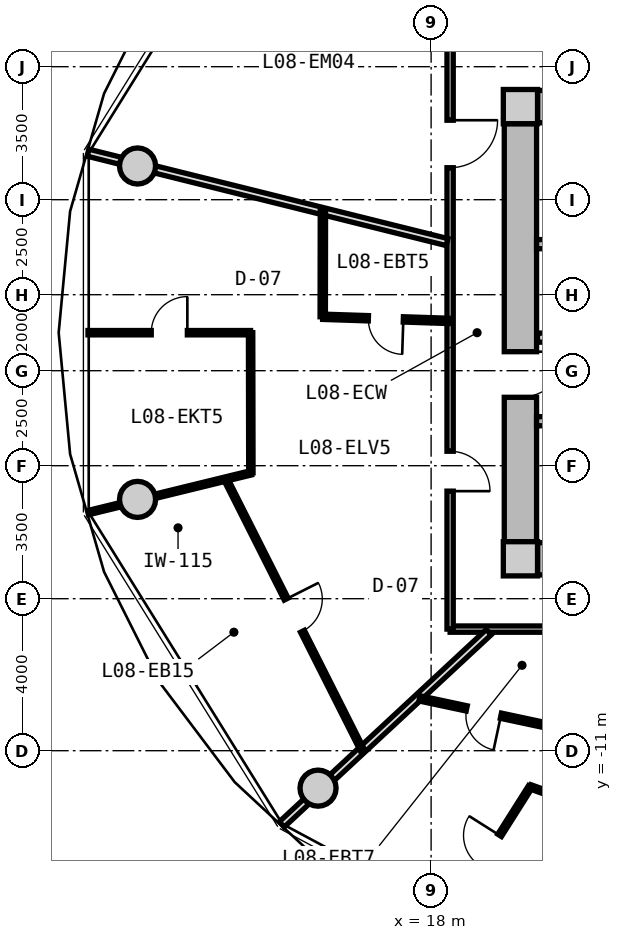
"""IFC4 building model, lengths in metres.
Left out: names, types, materials, properties, quantities, classifications, styles, units other than length and angle.
Written with IfcOpenShell. Run it as: python <this file> out.ifc"""

import sys

from ifc_helpers import new_model, si_unit, direction, frame, frame_2d, origin, origin_2d, place, context, subcontext, project, spatial, rectangle, circle, extrude, source, transform, mapped, element, fill, save


model = new_model("IFC4")
c1 = context("Model", 3, precision=1e-05, world=origin(), true_north=direction((0.0, 1.0)))
c2 = subcontext(c1, "Body", "Model", "MODEL_VIEW")
j1 = project(units=[si_unit("LENGTHUNIT", "METRE"), si_unit("PLANEANGLEUNIT", "RADIAN")], contexts=[c1])
p1 = place(None, origin())
s1 = spatial("IfcSite", under=j1, at=p1, CompositionType="ELEMENT")
p2 = place(p1, origin())
s2 = spatial("IfcBuilding", under=s1, at=p2, CompositionType="ELEMENT")
p3 = place(p2, frame((0.0, 0.0, 30.75)))
s3 = spatial("IfcBuildingStorey", under=s2, at=p3, CompositionType="ELEMENT", Elevation=30.75)
m1 = source(origin(), c2, "Body", "SweptSolid", [
    extrude(rectangle(XDim=0.9, YDim=0.9, at=origin_2d()), origin(), (0.0, 0.0, 1.0), 3.05),
])
for number, where, z_axis, x_axis in (
    (1, (20.35, -5.95, 0.0), (0.0, 0.0, 1.0), (1.0, 0.0, 0.0)),
    (2, (20.35, 5.95, 0.0), (0.0, 0.0, 1.0), (1.0, 0.0, 0.0)),
):
    element("IfcColumn", number, at=place(p3, frame(where, z_axis=z_axis, x_axis=x_axis)), inside=s3, PredefinedType="COLUMN", context=c2, shape_type="MappedRepresentation", body=[
        mapped(m1, transform((0.0, 0.0, 0.0), x_axis=(1.0, 0.0, 0.0), y_axis=(0.0, 1.0, 0.0), z_axis=(0.0, 0.0, 1.0), scale=1.0)),
    ])
m2 = source(origin(), c2, "Body", "SweptSolid", [
    extrude(rectangle(XDim=14.4, YDim=0.85, at=frame_2d((7.2, 0.0))), origin(), (0.0, 0.0, 1.0), 2.79),
])
for number, where, z_axis, x_axis in (
    (3, (20.8, 5.95, 0.0), (0.0, 0.0, 1.0), (1.0, 0.0, 0.0)),
    (4, (35.2, -5.95, 0.0), (0.0, 0.0, 1.0), (-1.0, 0.0, 0.0)),
):
    element("IfcWall", number, at=place(p3, frame(where, z_axis=z_axis, x_axis=x_axis)), inside=s3, PredefinedType="SHEAR", context=c2, shape_type="MappedRepresentation", body=[
        mapped(m2, transform((0.0, 0.0, 0.0), x_axis=(1.0, 0.0, 0.0), y_axis=(0.0, 1.0, 0.0), z_axis=(0.0, 0.0, 1.0), scale=1.0)),
    ])
m3 = source(origin(), c2, "Body", "SweptSolid", [
    extrude(rectangle(XDim=11.0, YDim=0.85, at=frame_2d((5.5, 0.0))), origin(), (0.0, 0.0, 1.0), 2.79),
])
p4 = place(p3, frame((20.35, -5.5, 0.0), z_axis=(0.0, 0.0, 1.0), x_axis=(0.0, 1.0, 0.0)))
e5 = element("IfcWall", 5, at=p4, inside=s3, PredefinedType="SHEAR", context=c2, shape_type="MappedRepresentation", body=[
    mapped(m3, transform((0.0, 0.0, 0.0), x_axis=(1.0, 0.0, 0.0), y_axis=(0.0, 1.0, 0.0), z_axis=(0.0, 0.0, 1.0), scale=1.0)),
])
p5 = place(p4, frame((3.8, 0.0, 0.0)))
e6 = element("IfcOpeningElement", 6, at=p5, cuts=e5, PredefinedType="OPENING", context=c2, shape_type="SweptSolid", body=[
    extrude(rectangle(XDim=1.2, YDim=2.15, at=frame_2d((0.6, 1.075))), frame((0.0, 0.435, 0.0), z_axis=(0.0, -1.0, 0.0), x_axis=(1.0, 0.0, 0.0)), (0.0, 0.0, 1.0), 0.87),
])
m4 = source(origin(), c2, "Body", "SweptSolid", [
    extrude(circle(Radius=0.475, at=origin_2d()), origin(), (0.0, 0.0, 1.0), 3.05),
])
for number, where, z_axis, x_axis in (
    (7, (10.275, 4.387, 0.0), (0.0, 0.0, 1.0), (1.0, 0.0, 0.0)),
    (8, (10.275, -4.387, 0.0), (0.0, 0.0, 1.0), (1.0, 0.0, 0.0)),
    (9, (15.025, -11.985, 0.0), (0.0, 0.0, 1.0), (1.0, 0.0, 0.0)),
):
    element("IfcColumn", number, at=place(p3, frame(where, z_axis=z_axis, x_axis=x_axis)), inside=s3, PredefinedType="COLUMN", context=c2, shape_type="MappedRepresentation", body=[
        mapped(m4, transform((0.0, 0.0, 0.0), x_axis=(1.0, 0.0, 0.0), y_axis=(0.0, 1.0, 0.0), z_axis=(0.0, 0.0, 1.0), scale=1.0)),
    ])
m5 = source(origin(), c2, "Body", "SweptSolid", [
    extrude(rectangle(XDim=7.765, YDim=0.24, at=frame_2d((3.883, 0.0))), origin(), (0.0, 0.0, 1.0), 2.79),
])
p6 = place(p3, frame((20.775, 2.33, 0.0), z_axis=(0.0, 0.0, 1.0), x_axis=(1.0, 0.0, 0.0)))
e10 = element("IfcWall", 10, at=p6, inside=s3, PredefinedType="PARTITIONING", context=c2, shape_type="MappedRepresentation", body=[
    mapped(m5, transform((0.0, 0.0, 0.0), x_axis=(1.0, 0.0, 0.0), y_axis=(0.0, 1.0, 0.0), z_axis=(0.0, 0.0, 1.0), scale=1.0)),
])
p7 = place(p3, frame((20.775, -2.33, 0.0), z_axis=(0.0, 0.0, 1.0), x_axis=(1.0, 0.0, 0.0)))
e11 = element("IfcWall", 11, at=p7, inside=s3, PredefinedType="PARTITIONING", context=c2, shape_type="MappedRepresentation", body=[
    mapped(m5, transform((0.0, 0.0, 0.0), x_axis=(1.0, 0.0, 0.0), y_axis=(0.0, 1.0, 0.0), z_axis=(0.0, 0.0, 1.0), scale=1.0)),
])
p8 = place(p7, frame((0.885, 0.0, 0.0)))
e12 = element("IfcOpeningElement", 12, at=p8, cuts=e11, PredefinedType="OPENING", context=c2, shape_type="SweptSolid", body=[
    extrude(rectangle(XDim=1.1, YDim=2.15, at=frame_2d((0.55, 1.075))), frame((0.0, 0.13, 0.0), z_axis=(0.0, -1.0, 0.0), x_axis=(1.0, 0.0, 0.0)), (0.0, 0.0, 1.0), 0.26),
])
m6 = source(origin(), c2, "Body", "SweptSolid", [
    extrude(rectangle(XDim=7.62, YDim=0.24, at=frame_2d((3.81, 0.0))), origin(), (0.0, 0.0, 1.0), 2.775),
])
p9 = place(p3, frame((20.8, -0.13, 0.0), z_axis=(0.0, 0.0, 1.0), x_axis=(1.0, 0.0, 0.0)))
e13 = element("IfcWall", 13, at=p9, inside=s3, PredefinedType="PARTITIONING", context=c2, shape_type="MappedRepresentation", body=[
    mapped(m6, transform((0.0, 0.0, 0.0), x_axis=(1.0, 0.0, 0.0), y_axis=(0.0, 1.0, 0.0), z_axis=(0.0, 0.0, 1.0), scale=1.0)),
])
p10 = place(p9, frame((6.22, 0.0, 0.0)))
e14 = element("IfcOpeningElement", 14, at=p10, cuts=e13, PredefinedType="OPENING", context=c2, shape_type="SweptSolid", body=[
    extrude(rectangle(XDim=1.0, YDim=2.1, at=frame_2d((0.5, 1.05))), frame((0.0, 0.13, 0.0), z_axis=(0.0, -1.0, 0.0), x_axis=(1.0, 0.0, 0.0)), (0.0, 0.0, 1.0), 0.26),
])
p11 = place(p9, frame((0.85, 0.0, 0.0)))
e15 = element("IfcOpeningElement", 15, at=p11, cuts=e13, PredefinedType="OPENING", context=c2, shape_type="SweptSolid", body=[
    extrude(rectangle(XDim=1.1, YDim=2.2, at=frame_2d((0.55, 1.1))), frame((0.0, 0.13, 0.0), z_axis=(0.0, -1.0, 0.0), x_axis=(1.0, 0.0, 0.0)), (0.0, 0.0, 1.0), 0.26),
])
p12 = place(p9, frame((3.85, 0.0, 0.0)))
e16 = element("IfcOpeningElement", 16, at=p12, cuts=e13, PredefinedType="OPENING", context=c2, shape_type="SweptSolid", body=[
    extrude(rectangle(XDim=1.1, YDim=2.2, at=frame_2d((0.55, 1.1))), frame((0.0, 0.13, 0.0), z_axis=(0.0, -1.0, 0.0), x_axis=(1.0, 0.0, 0.0)), (0.0, 0.0, 1.0), 0.26),
])
m7 = source(origin(), c2, "Body", "SweptSolid", [
    extrude(rectangle(XDim=19.0, YDim=0.165, at=frame_2d((9.5, 0.0))), origin(), (0.0, 0.0, 1.0), 2.775),
])
p13 = place(p3, frame((37.5, -7.8, 0.0), z_axis=(0.0, 0.0, 1.0), x_axis=(-1.0, 0.0, 0.0)))
e17 = element("IfcWall", 17, at=p13, inside=s3, PredefinedType="PARTITIONING", context=c2, shape_type="MappedRepresentation", body=[
    mapped(m7, transform((0.0, 0.0, 0.0), x_axis=(1.0, 0.0, 0.0), y_axis=(0.0, 1.0, 0.0), z_axis=(0.0, 0.0, 1.0), scale=1.0)),
])
p14 = place(p13, frame((7.336, 0.0, 0.0)))
e18 = element("IfcOpeningElement", 18, at=p14, cuts=e17, PredefinedType="OPENING", context=c2, shape_type="SweptSolid", body=[
    extrude(rectangle(XDim=1.05, YDim=2.15, at=frame_2d((0.525, 1.075))), frame((0.0, 0.093, 0.0), z_axis=(0.0, -1.0, 0.0), x_axis=(1.0, 0.0, 0.0)), (0.0, 0.0, 1.0), 0.185),
])
m8 = source(origin(), c2, "Body", "SweptSolid", [
    extrude(rectangle(XDim=15.6, YDim=0.165, at=frame_2d((7.8, 0.0))), origin(), (0.0, 0.0, 1.0), 2.775),
])
p15 = place(p3, frame((18.5, -7.8, 0.0), z_axis=(0.0, 0.0, 1.0), x_axis=(0.0, 1.0, 0.0)))
e19 = element("IfcWall", 19, at=p15, inside=s3, PredefinedType="PARTITIONING", context=c2, shape_type="MappedRepresentation", body=[
    mapped(m8, transform((0.0, 0.0, 0.0), x_axis=(1.0, 0.0, 0.0), y_axis=(0.0, 1.0, 0.0), z_axis=(0.0, 0.0, 1.0), scale=1.0)),
])
p16 = place(p15, frame((12.141, 0.0, 0.0)))
e20 = element("IfcOpeningElement", 20, at=p16, cuts=e19, PredefinedType="OPENING", context=c2, shape_type="SweptSolid", body=[
    extrude(rectangle(XDim=1.25, YDim=2.2, at=frame_2d((0.625, 1.1))), frame((0.0, 0.093, 0.0), z_axis=(0.0, -1.0, 0.0), x_axis=(1.0, 0.0, 0.0)), (0.0, 0.0, 1.0), 0.185),
])
p17 = place(p15, frame((3.63, 0.0, 0.0)))
e21 = element("IfcOpeningElement", 21, at=p17, cuts=e19, PredefinedType="OPENING", context=c2, shape_type="SweptSolid", body=[
    extrude(rectangle(XDim=1.05, YDim=2.15, at=frame_2d((0.525, 1.075))), frame((0.0, 0.093, 0.0), z_axis=(0.0, -1.0, 0.0), x_axis=(1.0, 0.0, 0.0)), (0.0, 0.0, 1.0), 0.185),
])
m9 = source(origin(), c2, "Body", "SweptSolid", [
    extrude(rectangle(XDim=9.737, YDim=0.19, at=frame_2d((4.869, 0.0))), origin(), (0.0, 0.0, 1.0), 2.225),
])
p18 = place(p3, frame((18.42, 2.385, 0.0), z_axis=(0.0, 0.0, 1.0), x_axis=(-0.970392716238, 0.241532557375, 0.0)))
e22 = element("IfcWall", 22, at=p18, inside=s3, PredefinedType="PARTITIONING", context=c2, shape_type="MappedRepresentation", body=[
    mapped(m9, transform((0.0, 0.0, 0.0), x_axis=(1.0, 0.0, 0.0), y_axis=(0.0, 1.0, 0.0), z_axis=(0.0, 0.0, 1.0), scale=1.0)),
])
m10 = source(origin(), c2, "Body", "SweptSolid", [
    extrude(rectangle(XDim=7.435, YDim=0.19, at=frame_2d((3.717, 0.0))), origin(), (0.0, 0.0, 1.0), 2.225),
])
p19 = place(p3, frame((19.517, -7.88, 0.0), z_axis=(0.0, 0.0, 1.0), x_axis=(-0.732651956848, -0.680603489652, 0.0)))
e23 = element("IfcWall", 23, at=p19, inside=s3, PredefinedType="PARTITIONING", context=c2, shape_type="MappedRepresentation", body=[
    mapped(m10, transform((0.0, 0.0, 0.0), x_axis=(1.0, 0.0, 0.0), y_axis=(0.0, 1.0, 0.0), z_axis=(0.0, 0.0, 1.0), scale=1.0)),
])
m11 = source(origin(), c2, "Body", "SweptSolid", [
    extrude(rectangle(XDim=8.018, YDim=0.115, at=frame_2d((4.009, 0.0))), origin(), (0.0, 0.0, 1.0), 2.775),
])
p20 = place(p3, frame((12.596, -3.854, 0.0), z_axis=(0.0, 0.0, 1.0), x_axis=(0.450134355233, -0.89296084026, 0.0)))
e24 = element("IfcWall", 24, at=p20, inside=s3, PredefinedType="PARTITIONING", context=c2, shape_type="MappedRepresentation", body=[
    mapped(m11, transform((0.0, 0.0, 0.0), x_axis=(1.0, 0.0, 0.0), y_axis=(0.0, 1.0, 0.0), z_axis=(0.0, 0.0, 1.0), scale=1.0)),
])
p21 = place(p20, frame((3.534, 0.0, 0.0)))
e25 = element("IfcOpeningElement", 25, at=p21, cuts=e24, PredefinedType="OPENING", context=c2, shape_type="SweptSolid", body=[
    extrude(rectangle(XDim=0.95, YDim=2.1, at=frame_2d((0.475, 1.05))), frame((0.0, 0.067, 0.0), z_axis=(0.0, -1.0, 0.0), x_axis=(1.0, 0.0, 0.0)), (0.0, 0.0, 1.0), 0.135),
])
m12 = source(origin(), c2, "Body", "SweptSolid", [
    extrude(rectangle(XDim=4.414, YDim=0.115, at=frame_2d((2.207, 0.0))), origin(), (0.0, 0.0, 1.0), 2.225),
])
p22 = place(p3, frame((13.259, -3.688, 0.0), z_axis=(0.0, 0.0, 1.0), x_axis=(-0.971401274504, -0.237443812073, 0.0)))
e26 = element("IfcWall", 26, at=p22, inside=s3, PredefinedType="PARTITIONING", context=c2, shape_type="MappedRepresentation", body=[
    mapped(m12, transform((0.0, 0.0, 0.0), x_axis=(1.0, 0.0, 0.0), y_axis=(0.0, 1.0, 0.0), z_axis=(0.0, 0.0, 1.0), scale=1.0)),
])
m13 = source(origin(), c2, "Body", "SweptSolid", [
    extrude(rectangle(XDim=3.323, YDim=0.14, at=frame_2d((1.662, 0.0))), origin(), (0.0, 0.0, 1.0), 2.775),
])
p23 = place(p3, frame((18.47, 0.311, 0.0), z_axis=(0.0, 0.0, 1.0), x_axis=(-0.999467979553, 0.032615300817, 0.0)))
e27 = element("IfcWall", 27, at=p23, inside=s3, PredefinedType="PARTITIONING", context=c2, shape_type="MappedRepresentation", body=[
    mapped(m13, transform((0.0, 0.0, 0.0), x_axis=(1.0, 0.0, 0.0), y_axis=(0.0, 1.0, 0.0), z_axis=(0.0, 0.0, 1.0), scale=1.0)),
])
p24 = place(p23, frame((1.202, 0.0, 0.0)))
e28 = element("IfcOpeningElement", 28, at=p24, cuts=e27, PredefinedType="OPENING", context=c2, shape_type="SweptSolid", body=[
    extrude(rectangle(XDim=0.92, YDim=2.1, at=frame_2d((0.46, 1.05))), frame((0.0, 0.08, 0.0), z_axis=(0.0, -1.0, 0.0), x_axis=(1.0, 0.0, 0.0)), (0.0, 0.0, 1.0), 0.16),
])
m14 = source(origin(), c2, "Body", "SweptSolid", [
    extrude(rectangle(XDim=2.795, YDim=0.14, at=frame_2d((1.397, 0.0))), origin(), (0.0, 0.0, 1.0), 2.775),
])
p25 = place(p3, frame((15.148, 0.419, 0.0), z_axis=(0.0, 0.0, 1.0), x_axis=(0.001659531299, 0.999998622977, 0.0)))
e29 = element("IfcWall", 29, at=p25, inside=s3, PredefinedType="PARTITIONING", context=c2, shape_type="MappedRepresentation", body=[
    mapped(m14, transform((0.0, 0.0, 0.0), x_axis=(1.0, 0.0, 0.0), y_axis=(0.0, 1.0, 0.0), z_axis=(0.0, 0.0, 1.0), scale=1.0)),
])
m15 = source(origin(), c2, "Body", "SweptSolid", [
    extrude(rectangle(XDim=4.279, YDim=0.115, at=frame_2d((2.139, 0.0))), origin(), (0.0, 0.0, 1.0), 2.775),
])
p26 = place(p3, frame((13.25, 0.0, 0.0), z_axis=(0.0, 0.0, 1.0), x_axis=(-1.0, 0.0, 0.0)))
e30 = element("IfcWall", 30, at=p26, inside=s3, PredefinedType="PARTITIONING", context=c2, shape_type="MappedRepresentation", body=[
    mapped(m15, transform((0.0, 0.0, 0.0), x_axis=(1.0, 0.0, 0.0), y_axis=(0.0, 1.0, 0.0), z_axis=(0.0, 0.0, 1.0), scale=1.0)),
])
p27 = place(p26, frame((1.664, 0.0, 0.0)))
e31 = element("IfcOpeningElement", 31, at=p27, cuts=e30, PredefinedType="OPENING", context=c2, shape_type="SweptSolid", body=[
    extrude(rectangle(XDim=0.95, YDim=2.1, at=frame_2d((0.475, 1.05))), frame((0.0, 0.067, 0.0), z_axis=(0.0, -1.0, 0.0), x_axis=(1.0, 0.0, 0.0)), (0.0, 0.0, 1.0), 0.135),
])
m16 = source(origin(), c2, "Body", "SweptSolid", [
    extrude(rectangle(XDim=3.689, YDim=0.115, at=frame_2d((1.844, 0.0))), origin(), (0.0, 0.0, 1.0), 2.775),
])
p28 = place(p3, frame((13.25, 0.0, 0.0), z_axis=(0.0, 0.0, 1.0), x_axis=(0.001919382261, -0.999998157984, 0.0)))
e32 = element("IfcWall", 32, at=p28, inside=s3, PredefinedType="PARTITIONING", context=c2, shape_type="MappedRepresentation", body=[
    mapped(m16, transform((0.0, 0.0, 0.0), x_axis=(1.0, 0.0, 0.0), y_axis=(0.0, 1.0, 0.0), z_axis=(0.0, 0.0, 1.0), scale=1.0)),
])
m17 = source(origin(), c2, "Body", "SweptSolid", [
    extrude(rectangle(XDim=3.459, YDim=0.14, at=frame_2d((1.729, 0.0))), origin(), (0.0, 0.0, 1.0), 2.775),
])
p29 = place(p3, frame((21.078, -10.344, 0.0), z_axis=(0.0, 0.0, 1.0), x_axis=(-0.978006468578, 0.208574560815, 0.0)))
e33 = element("IfcWall", 33, at=p29, inside=s3, PredefinedType="PARTITIONING", context=c2, shape_type="MappedRepresentation", body=[
    mapped(m17, transform((0.0, 0.0, 0.0), x_axis=(1.0, 0.0, 0.0), y_axis=(0.0, 1.0, 0.0), z_axis=(0.0, 0.0, 1.0), scale=1.0)),
])
p30 = place(p29, frame((1.27, 0.0, 0.0)))
e34 = element("IfcOpeningElement", 34, at=p30, cuts=e33, PredefinedType="OPENING", context=c2, shape_type="SweptSolid", body=[
    extrude(rectangle(XDim=0.92, YDim=2.1, at=frame_2d((0.46, 1.05))), frame((0.0, 0.08, 0.0), z_axis=(0.0, -1.0, 0.0), x_axis=(1.0, 0.0, 0.0)), (0.0, 0.0, 1.0), 0.16),
])
m18 = source(origin(), c2, "Body", "SweptSolid", [
    extrude(rectangle(XDim=3.974, YDim=0.115, at=frame_2d((1.987, 0.0))), origin(), (0.0, 0.0, 1.0), 2.775),
])
p31 = place(p3, frame((20.611, -11.95, 0.0), z_axis=(0.0, 0.0, 1.0), x_axis=(-0.534810918023, -0.844971764003, 0.0)))
e35 = element("IfcWall", 35, at=p31, inside=s3, PredefinedType="PARTITIONING", context=c2, shape_type="MappedRepresentation", body=[
    mapped(m18, transform((0.0, 0.0, 0.0), x_axis=(1.0, 0.0, 0.0), y_axis=(0.0, 1.0, 0.0), z_axis=(0.0, 0.0, 1.0), scale=1.0)),
])
p32 = place(p31, frame((1.512, 0.0, 0.0)))
e36 = element("IfcOpeningElement", 36, at=p32, cuts=e35, PredefinedType="OPENING", context=c2, shape_type="SweptSolid", body=[
    extrude(rectangle(XDim=0.95, YDim=2.1, at=frame_2d((0.475, 1.05))), frame((0.0, 0.067, 0.0), z_axis=(0.0, -1.0, 0.0), x_axis=(1.0, 0.0, 0.0)), (0.0, 0.0, 1.0), 0.135),
])
m19 = source(origin(), c2, "Body", "SweptSolid", [
    extrude(rectangle(XDim=3.814, YDim=0.115, at=frame_2d((1.907, 0.0))), origin(), (0.0, 0.0, 1.0), 2.775),
])
p33 = place(p3, frame((20.611, -11.95, 0.0), z_axis=(0.0, 0.0, 1.0), x_axis=(0.940935542004, -0.338585743637, 0.0)))
e37 = element("IfcWall", 37, at=p33, inside=s3, PredefinedType="PARTITIONING", context=c2, shape_type="MappedRepresentation", body=[
    mapped(m19, transform((0.0, 0.0, 0.0), x_axis=(1.0, 0.0, 0.0), y_axis=(0.0, 1.0, 0.0), z_axis=(0.0, 0.0, 1.0), scale=1.0)),
])
m20 = source(origin(), c2, "Body", "SweptSolid", [
    extrude(rectangle(XDim=1.2, YDim=2.15, at=frame_2d((0.6, 1.075))), frame((0.0, 0.025, 0.0), z_axis=(0.0, -1.0, 0.0), x_axis=(1.0, 0.0, 0.0)), (0.0, 0.0, 1.0), 0.05),
])
p34 = place(p5, frame((1.2, 0.0, 0.0), z_axis=(0.0, 0.0, 1.0), x_axis=(-1.0, 0.0, 0.0)))
e38 = element("IfcDoor", 38, at=p34, inside=s3, OperationType="SINGLE_SWING_LEFT", PredefinedType="DOOR", context=c2, shape_type="MappedRepresentation", body=[
    mapped(m20, transform((0.0, 0.0, 0.0), x_axis=(1.0, 0.0, 0.0), y_axis=(0.0, 1.0, 0.0), z_axis=(0.0, 0.0, 1.0), scale=1.0)),
])
fill(e6, e38)
m21 = source(origin(), c2, "Body", "SweptSolid", [
    extrude(rectangle(XDim=1.25, YDim=2.2, at=frame_2d((0.625, 1.1))), frame((0.0, 0.025, 0.0), z_axis=(0.0, -1.0, 0.0), x_axis=(1.0, 0.0, 0.0)), (0.0, 0.0, 1.0), 0.05),
])
p35 = place(p16, frame((1.25, 0.0, 0.0), z_axis=(0.0, 0.0, 1.0), x_axis=(-1.0, 0.0, 0.0)))
e39 = element("IfcDoor", 39, at=p35, inside=s3, OperationType="SINGLE_SWING_LEFT", PredefinedType="DOOR", context=c2, shape_type="MappedRepresentation", body=[
    mapped(m21, transform((0.0, 0.0, 0.0), x_axis=(1.0, 0.0, 0.0), y_axis=(0.0, 1.0, 0.0), z_axis=(0.0, 0.0, 1.0), scale=1.0)),
])
fill(e20, e39)
m22 = source(origin(), c2, "Body", "SweptSolid", [
    extrude(rectangle(XDim=1.05, YDim=2.15, at=frame_2d((0.525, 1.075))), frame((0.0, 0.025, 0.0), z_axis=(0.0, -1.0, 0.0), x_axis=(1.0, 0.0, 0.0)), (0.0, 0.0, 1.0), 0.05),
])
p36 = place(p17, frame((1.05, 0.0, 0.0), z_axis=(0.0, 0.0, 1.0), x_axis=(-1.0, 0.0, 0.0)))
e40 = element("IfcDoor", 40, at=p36, inside=s3, OperationType="SINGLE_SWING_RIGHT", PredefinedType="DOOR", context=c2, shape_type="MappedRepresentation", body=[
    mapped(m22, transform((0.0, 0.0, 0.0), x_axis=(1.0, 0.0, 0.0), y_axis=(0.0, 1.0, 0.0), z_axis=(0.0, 0.0, 1.0), scale=1.0)),
])
fill(e21, e40)
m23 = source(origin(), c2, "Body", "SweptSolid", [
    extrude(rectangle(XDim=0.92, YDim=2.1, at=frame_2d((0.46, 1.05))), frame((0.0, 0.025, 0.0), z_axis=(0.0, -1.0, 0.0), x_axis=(1.0, 0.0, 0.0)), (0.0, 0.0, 1.0), 0.05),
])
p37 = place(p24, origin())
e41 = element("IfcDoor", 41, at=p37, inside=s3, OperationType="SINGLE_SWING_LEFT", PredefinedType="DOOR", context=c2, shape_type="MappedRepresentation", body=[
    mapped(m23, transform((0.0, 0.0, 0.0), x_axis=(1.0, 0.0, 0.0), y_axis=(0.0, 1.0, 0.0), z_axis=(0.0, 0.0, 1.0), scale=1.0)),
])
fill(e28, e41)
m24 = source(origin(), c2, "Body", "SweptSolid", [
    extrude(rectangle(XDim=0.95, YDim=2.1, at=frame_2d((0.475, 1.05))), frame((0.0, 0.025, 0.0), z_axis=(0.0, -1.0, 0.0), x_axis=(1.0, 0.0, 0.0)), (0.0, 0.0, 1.0), 0.05),
])
p38 = place(p27, frame((0.95, 0.0, 0.0), z_axis=(0.0, 0.0, 1.0), x_axis=(-1.0, 0.0, 0.0)))
e42 = element("IfcDoor", 42, at=p38, inside=s3, OperationType="SINGLE_SWING_RIGHT", PredefinedType="DOOR", context=c2, shape_type="MappedRepresentation", body=[
    mapped(m24, transform((0.0, 0.0, 0.0), x_axis=(1.0, 0.0, 0.0), y_axis=(0.0, 1.0, 0.0), z_axis=(0.0, 0.0, 1.0), scale=1.0)),
])
fill(e31, e42)
p39 = place(p21, origin())
e43 = element("IfcDoor", 43, at=p39, inside=s3, OperationType="SINGLE_SWING_LEFT", PredefinedType="DOOR", context=c2, shape_type="MappedRepresentation", body=[
    mapped(m24, transform((0.0, 0.0, 0.0), x_axis=(1.0, 0.0, 0.0), y_axis=(0.0, 1.0, 0.0), z_axis=(0.0, 0.0, 1.0), scale=1.0)),
])
fill(e25, e43)
p40 = place(p30, origin())
e44 = element("IfcDoor", 44, at=p40, inside=s3, OperationType="SINGLE_SWING_LEFT", PredefinedType="DOOR", context=c2, shape_type="MappedRepresentation", body=[
    mapped(m23, transform((0.0, 0.0, 0.0), x_axis=(1.0, 0.0, 0.0), y_axis=(0.0, 1.0, 0.0), z_axis=(0.0, 0.0, 1.0), scale=1.0)),
])
fill(e34, e44)
p41 = place(p32, frame((0.95, 0.0, 0.0), z_axis=(0.0, 0.0, 1.0), x_axis=(-1.0, 0.0, 0.0)))
e45 = element("IfcDoor", 45, at=p41, inside=s3, OperationType="SINGLE_SWING_RIGHT", PredefinedType="DOOR", context=c2, shape_type="MappedRepresentation", body=[
    mapped(m24, transform((0.0, 0.0, 0.0), x_axis=(1.0, 0.0, 0.0), y_axis=(0.0, 1.0, 0.0), z_axis=(0.0, 0.0, 1.0), scale=1.0)),
])
fill(e36, e45)
save(model, sys.argv[1])
